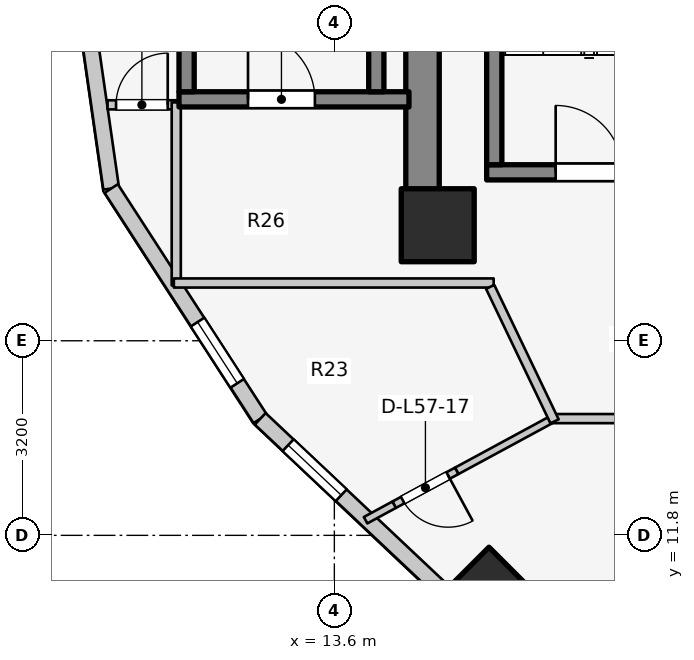
"""IFC4 building model, lengths in metres.
Left out: names, types, materials, properties, quantities, classifications, styles, units other than length and angle.
Written with IfcOpenShell. Run it as: python <this file> out.ifc"""

import sys

from ifc_helpers import new_model, si_unit, direction, frame, frame_2d, origin, origin_2d, place, context, subcontext, project, spatial, rectangle, extrude, element, fill, save


model = new_model("IFC4")
c1 = context("Model", 3, precision=1e-05, world=origin(), true_north=direction((0.0, 1.0)))
c2 = subcontext(c1, "Body", "Model", "MODEL_VIEW")
j1 = project(units=[si_unit("LENGTHUNIT", "METRE"), si_unit("PLANEANGLEUNIT", "RADIAN")], contexts=[c1])
p1 = place(None, origin())
s1 = spatial("IfcSite", under=j1, at=p1, CompositionType="ELEMENT")
p2 = place(p1, origin())
s2 = spatial("IfcBuilding", under=s1, at=p2, CompositionType="ELEMENT")
p3 = place(p2, frame((0.0, 0.0, 187.0)))
s3 = spatial("IfcBuildingStorey", under=s2, at=p3, CompositionType="ELEMENT", Elevation=187.0)
p4 = place(p3, frame((15.05, 17.05, 0.0), z_axis=(0.0, 0.0, 1.0), x_axis=(0.0, 1.0, 0.0)))
e1 = element("IfcWall", 1, at=p4, inside=s3, PredefinedType="SHEAR", context=c2, shape_type="SweptSolid", body=[
    extrude(rectangle(XDim=12.8, YDim=0.55, at=frame_2d((6.4, 0.0))), origin(), (0.0, 0.0, 1.0), 3.1),
])
p5 = place(p3, frame((16.105, 17.77, 0.0), z_axis=(0.0, 0.0, 1.0), x_axis=(1.0, 0.0, 0.0)))
e2 = element("IfcWall", 2, at=p5, inside=s3, PredefinedType="SOLIDWALL", context=c2, shape_type="SweptSolid", body=[
    extrude(rectangle(XDim=3.37, YDim=0.25, at=frame_2d((1.685, 0.0))), origin(), (0.0, 0.0, 1.0), 3.1),
])
p6 = place(p5, frame((1.135, 0.0, 0.0)))
e3 = element("IfcOpeningElement", 3, at=p6, cuts=e2, PredefinedType="OPENING", context=c2, shape_type="SweptSolid", body=[
    extrude(rectangle(XDim=1.1, YDim=2.1, at=frame_2d((0.55, 1.05))), frame((0.0, 0.135, 0.0), z_axis=(0.0, -1.0, 0.0), x_axis=(1.0, 0.0, 0.0)), (0.0, 0.0, 1.0), 0.27),
])
p7 = place(p3, frame((16.23, 17.895, 0.0), z_axis=(0.0, 0.0, 1.0), x_axis=(0.0, 1.0, 0.0)))
e4 = element("IfcWall", 4, at=p7, inside=s3, PredefinedType="SOLIDWALL", context=c2, shape_type="SweptSolid", body=[
    extrude(rectangle(XDim=7.81, YDim=0.25, at=frame_2d((3.905, 0.0))), origin(), (0.0, 0.0, 1.0), 3.1),
])
p8 = place(p3, frame((11.045, 18.97, 0.0), z_axis=(0.0, 0.0, 1.0), x_axis=(1.0, 0.0, 0.0)))
e5 = element("IfcWall", 5, at=p8, inside=s3, PredefinedType="SOLIDWALL", context=c2, shape_type="SweptSolid", body=[
    extrude(rectangle(XDim=3.782, YDim=0.25, at=frame_2d((1.891, 0.0))), origin(), (0.0, 0.0, 1.0), 3.1),
])
p9 = place(p8, frame((1.135, 0.0, 0.0)))
e6 = element("IfcOpeningElement", 6, at=p9, cuts=e5, PredefinedType="OPENING", context=c2, shape_type="SweptSolid", body=[
    extrude(rectangle(XDim=1.1, YDim=2.1, at=frame_2d((0.55, 1.05))), frame((0.0, 0.135, 0.0), z_axis=(0.0, -1.0, 0.0), x_axis=(1.0, 0.0, 0.0)), (0.0, 0.0, 1.0), 0.27),
])
for number, where, z_axis, x_axis in (
    (7, (11.17, 19.095, 0.0), (0.0, 0.0, 1.0), (0.0, 1.0, 0.0)),
    (8, (14.29, 19.095, 0.0), (0.0, 0.0, 1.0), (0.0, 1.0, 0.0)),
):
    element("IfcWall", number, at=place(p3, frame(where, z_axis=z_axis, x_axis=x_axis)), inside=s3, PredefinedType="SOLIDWALL", context=c2, shape_type="SweptSolid", body=[
        extrude(rectangle(XDim=7.81, YDim=0.25, at=frame_2d((3.905, 0.0))), origin(), (0.0, 0.0, 1.0), 3.1),
    ])
p10 = place(p3, frame((15.3, 16.9, 0.0), z_axis=(0.0, 0.0, 1.0), x_axis=(1.0, 0.0, 0.0)))
e9 = element("IfcColumn", 9, at=p10, inside=s3, PredefinedType="COLUMN", context=c2, shape_type="SweptSolid", body=[
    extrude(rectangle(XDim=1.2, YDim=1.2, at=origin_2d()), origin(), (0.0, 0.0, 1.0), 3.1),
])
p11 = place(p3, frame((16.143, 10.969, 0.0), z_axis=(0.0, 0.0, 1.0), x_axis=(-0.707106781187, -0.707106781187, 0.0)))
e10 = element("IfcColumn", 10, at=p11, inside=s3, PredefinedType="COLUMN", context=c2, shape_type="SweptSolid", body=[
    extrude(rectangle(XDim=0.9, YDim=0.9, at=origin_2d()), origin(), (0.0, 0.0, 1.0), 3.1),
])
p12 = place(p3, frame((9.14, 23.0, 0.0), z_axis=(0.0, 0.0, 1.0), x_axis=(0.142227632286, -0.989833976288, 0.0)))
e11 = element("IfcWall", 11, at=p12, inside=s3, PredefinedType="STANDARD", context=c2, shape_type="SweptSolid", body=[
    extrude(rectangle(XDim=5.553, YDim=0.26, at=frame_2d((2.776, 0.0))), origin(), (0.0, 0.0, 1.0), 2.57),
])
p13 = place(p12, frame((1.506, 0.0, 0.75)))
e12 = element("IfcOpeningElement", 12, at=p13, cuts=e11, PredefinedType="OPENING", context=c2, shape_type="SweptSolid", body=[
    extrude(rectangle(XDim=1.2, YDim=1.5, at=frame_2d((0.6, 0.75))), frame((0.0, 0.14, 0.0), z_axis=(0.0, -1.0, 0.0), x_axis=(1.0, 0.0, 0.0)), (0.0, 0.0, 1.0), 0.28),
])
p14 = place(p3, frame((9.93, 17.503, 0.0), z_axis=(0.0, 0.0, 1.0), x_axis=(0.543358984534, -0.839500454989, 0.0)))
e13 = element("IfcWall", 13, at=p14, inside=s3, PredefinedType="STANDARD", context=c2, shape_type="SweptSolid", body=[
    extrude(rectangle(XDim=4.511, YDim=0.26, at=frame_2d((2.256, 0.0))), origin(), (0.0, 0.0, 1.0), 1.22),
])
p15 = place(p14, frame((2.615, 0.0, 0.15)))
e14 = element("IfcOpeningElement", 14, at=p15, cuts=e13, PredefinedType="OPENING", context=c2, shape_type="SweptSolid", body=[
    extrude(rectangle(XDim=1.2, YDim=0.9, at=frame_2d((0.6, 0.45))), frame((0.0, 0.14, 0.0), z_axis=(0.0, -1.0, 0.0), x_axis=(1.0, 0.0, 0.0)), (0.0, 0.0, 1.0), 0.28),
])
p16 = place(p3, frame((12.381, 13.716, 0.0), z_axis=(0.0, 0.0, 1.0), x_axis=(0.727667301037, -0.68593024354, 0.0)))
e15 = element("IfcWall", 15, at=p16, inside=s3, PredefinedType="STANDARD", context=c2, shape_type="SweptSolid", body=[
    extrude(rectangle(XDim=4.604, YDim=0.26, at=frame_2d((2.302, 0.0))), origin(), (0.0, 0.0, 1.0), 1.22),
])
p17 = place(p16, frame((0.631, 0.0, 0.15)))
e16 = element("IfcOpeningElement", 16, at=p17, cuts=e15, PredefinedType="OPENING", context=c2, shape_type="SweptSolid", body=[
    extrude(rectangle(XDim=1.2, YDim=0.9, at=frame_2d((0.6, 0.45))), frame((0.0, 0.14, 0.0), z_axis=(0.0, -1.0, 0.0), x_axis=(1.0, 0.0, 0.0)), (0.0, 0.0, 1.0), 0.28),
])
p18 = place(p3, frame((9.87, 18.88, 0.0), z_axis=(0.0, 0.0, 1.0), x_axis=(1.0, 0.0, 0.0)))
e17 = element("IfcWall", 17, at=p18, inside=s3, PredefinedType="PARTITIONING", context=c2, shape_type="SweptSolid", body=[
    extrude(rectangle(XDim=1.17, YDim=0.15, at=frame_2d((0.585, 0.0))), origin(), (0.0, 0.0, 1.0), 2.575),
])
p19 = place(p18, frame((0.14, 0.0, 0.0)))
e18 = element("IfcOpeningElement", 18, at=p19, cuts=e17, PredefinedType="OPENING", context=c2, shape_type="SweptSolid", body=[
    extrude(rectangle(XDim=0.85, YDim=2.05, at=frame_2d((0.425, 1.025))), frame((0.0, 0.085, 0.0), z_axis=(0.0, -1.0, 0.0), x_axis=(1.0, 0.0, 0.0)), (0.0, 0.0, 1.0), 0.17),
])
p20 = place(p3, frame((11.0, 15.91, 0.0), z_axis=(0.0, 0.0, 1.0), x_axis=(0.0, 1.0, 0.0)))
e19 = element("IfcWall", 19, at=p20, inside=s3, PredefinedType="PARTITIONING", context=c2, shape_type="SweptSolid", body=[
    extrude(rectangle(XDim=3.01, YDim=0.15, at=frame_2d((1.505, 0.0))), origin(), (0.0, 0.0, 1.0), 2.575),
])
p21 = place(p3, frame((10.96, 15.95, 0.0), z_axis=(0.0, 0.0, 1.0), x_axis=(1.0, 0.0, 0.0)))
e20 = element("IfcWall", 20, at=p21, inside=s3, PredefinedType="PARTITIONING", context=c2, shape_type="SweptSolid", body=[
    extrude(rectangle(XDim=5.26, YDim=0.15, at=frame_2d((2.63, 0.0))), origin(), (0.0, 0.0, 1.0), 1.22),
])
p22 = place(p3, frame((17.244, 13.744, 0.0), z_axis=(0.0, 0.0, 1.0), x_axis=(-0.879399863451, -0.476083900339, 0.0)))
e21 = element("IfcWall", 21, at=p22, inside=s3, PredefinedType="MOVABLE", context=c2, shape_type="SweptSolid", body=[
    extrude(rectangle(XDim=1.855, YDim=0.12, at=frame_2d((0.928, 0.0))), origin(), (0.0, 0.0, 1.0), 1.22),
])
p23 = place(p3, frame((15.612, 12.861, 0.0), z_axis=(0.0, 0.0, 1.0), x_axis=(-0.879342939039, -0.476189033433, 0.0)))
e22 = element("IfcWall", 22, at=p23, inside=s3, PredefinedType="MOVABLE", context=c2, shape_type="SweptSolid", body=[
    extrude(rectangle(XDim=1.17, YDim=0.12, at=frame_2d((0.585, 0.0))), origin(), (0.0, 0.0, 1.0), 2.11),
])
p24 = place(p23, frame((0.16, 0.0, 0.0)))
e23 = element("IfcOpeningElement", 23, at=p24, cuts=e22, PredefinedType="OPENING", context=c2, shape_type="SweptSolid", body=[
    extrude(rectangle(XDim=0.85, YDim=2.05, at=frame_2d((0.425, 1.025))), frame((0.0, 0.07, 0.0), z_axis=(0.0, -1.0, 0.0), x_axis=(1.0, 0.0, 0.0)), (0.0, 0.0, 1.0), 0.14),
])
p25 = place(p3, frame((14.583, 12.303, 0.0), z_axis=(0.0, 0.0, 1.0), x_axis=(-0.879427451533, -0.476032937401, 0.0)))
e24 = element("IfcWall", 24, at=p25, inside=s3, PredefinedType="MOVABLE", context=c2, shape_type="SweptSolid", body=[
    extrude(rectangle(XDim=0.534, YDim=0.12, at=frame_2d((0.267, 0.0))), origin(), (0.0, 0.0, 1.0), 2.575),
])
p26 = place(p3, frame((17.15, 13.72, 0.0), z_axis=(0.0, 0.0, 1.0), x_axis=(1.0, 0.0, 0.0)))
e25 = element("IfcWall", 25, at=p26, inside=s3, PredefinedType="PARTITIONING", context=c2, shape_type="SweptSolid", body=[
    extrude(rectangle(XDim=1.14, YDim=0.15, at=frame_2d((0.57, 0.0))), origin(), (0.0, 0.0, 1.0), 2.575),
])
p27 = place(p3, frame((17.222, 13.675, 0.0), z_axis=(0.0, 0.0, 1.0), x_axis=(-0.431973389813, 0.901886351207, 0.0)))
e26 = element("IfcWall", 26, at=p27, inside=s3, PredefinedType="PARTITIONING", context=c2, shape_type="SweptSolid", body=[
    extrude(rectangle(XDim=2.452, YDim=0.15, at=frame_2d((1.226, 0.0))), origin(), (0.0, 0.0, 1.0), 2.575),
])
p28 = place(p15, origin())
e27 = element("IfcWindow", 27, at=p28, inside=s3, PartitioningType="SINGLE_PANEL", PredefinedType="WINDOW", context=c2, shape_type="SweptSolid", body=[
    extrude(rectangle(XDim=1.2, YDim=0.9, at=frame_2d((0.6, 0.45))), frame((0.0, 0.03, 0.0), z_axis=(0.0, -1.0, 0.0), x_axis=(1.0, 0.0, 0.0)), (0.0, 0.0, 1.0), 0.06),
])
fill(e14, e27)
p29 = place(p17, origin())
e28 = element("IfcWindow", 28, at=p29, inside=s3, PartitioningType="SINGLE_PANEL", PredefinedType="WINDOW", context=c2, shape_type="SweptSolid", body=[
    extrude(rectangle(XDim=1.2, YDim=0.9, at=frame_2d((0.6, 0.45))), frame((0.0, 0.03, 0.0), z_axis=(0.0, -1.0, 0.0), x_axis=(1.0, 0.0, 0.0)), (0.0, 0.0, 1.0), 0.06),
])
fill(e16, e28)
p30 = place(p6, origin())
e29 = element("IfcDoor", 29, at=p30, inside=s3, OperationType="SINGLE_SWING_LEFT", PredefinedType="DOOR", context=c2, shape_type="SweptSolid", body=[
    extrude(rectangle(XDim=1.1, YDim=2.1, at=frame_2d((0.55, 1.05))), frame((0.0, 0.025, 0.0), z_axis=(0.0, -1.0, 0.0), x_axis=(1.0, 0.0, 0.0)), (0.0, 0.0, 1.0), 0.05),
])
fill(e3, e29)
p31 = place(p9, origin())
e30 = element("IfcDoor", 30, at=p31, inside=s3, OperationType="SINGLE_SWING_LEFT", PredefinedType="DOOR", context=c2, shape_type="SweptSolid", body=[
    extrude(rectangle(XDim=1.1, YDim=2.1, at=frame_2d((0.55, 1.05))), frame((0.0, 0.025, 0.0), z_axis=(0.0, -1.0, 0.0), x_axis=(1.0, 0.0, 0.0)), (0.0, 0.0, 1.0), 0.05),
])
fill(e6, e30)
p32 = place(p19, origin())
e31 = element("IfcDoor", 31, at=p32, inside=s3, OperationType="SINGLE_SWING_RIGHT", PredefinedType="DOOR", context=c2, shape_type="SweptSolid", body=[
    extrude(rectangle(XDim=0.85, YDim=2.05, at=frame_2d((0.425, 1.025))), frame((0.0, 0.025, 0.0), z_axis=(0.0, -1.0, 0.0), x_axis=(1.0, 0.0, 0.0)), (0.0, 0.0, 1.0), 0.05),
])
fill(e18, e31)
p33 = place(p24, origin())
e32 = element("IfcDoor", 32, at=p33, inside=s3, OperationType="SINGLE_SWING_LEFT", PredefinedType="DOOR", context=c2, shape_type="SweptSolid", body=[
    extrude(rectangle(XDim=0.85, YDim=2.05, at=frame_2d((0.425, 1.025))), frame((0.0, 0.025, 0.0), z_axis=(0.0, -1.0, 0.0), x_axis=(1.0, 0.0, 0.0)), (0.0, 0.0, 1.0), 0.05),
])
fill(e23, e32)
save(model, sys.argv[1])
